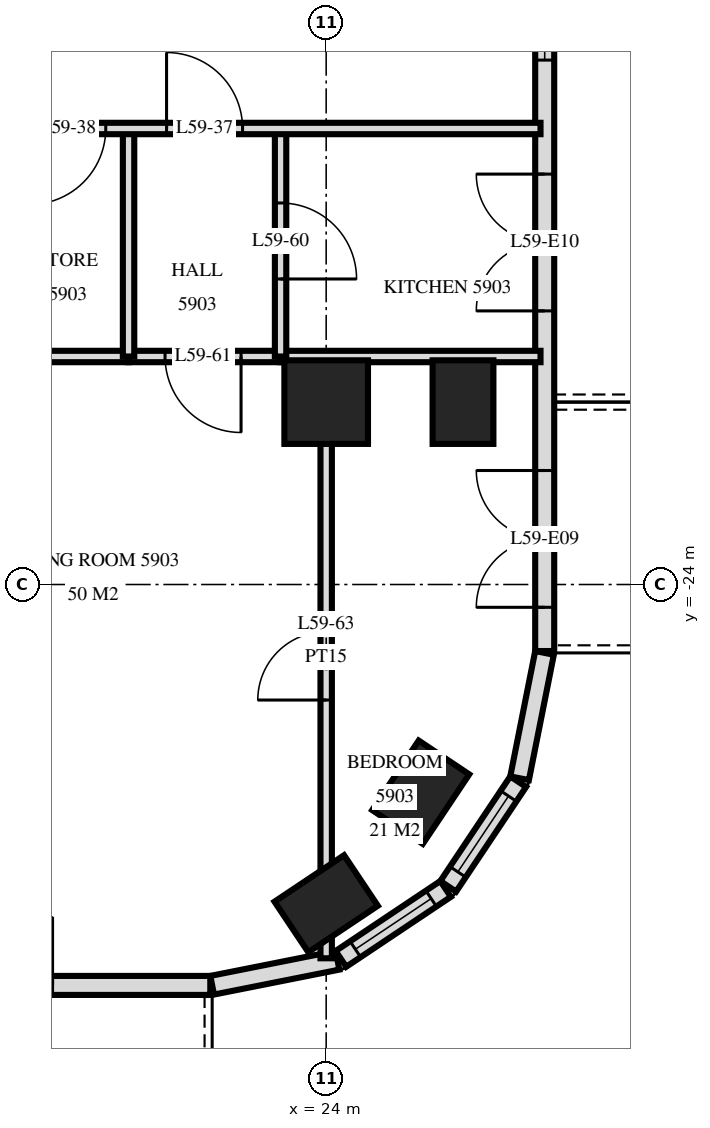
"""IFC4 building model, lengths in metres.
Left out: names, types, materials, properties, quantities, classifications, styles, units other than length and angle.
Written with IfcOpenShell. Run it as: python <this file> out.ifc"""

import sys

from ifc_helpers import new_model, si_unit, direction, frame, frame_2d, origin, origin_2d, place, context, subcontext, project, spatial, rectangle, extrude, element, fill, save


model = new_model("IFC4")
c1 = context("Model", 3, precision=1e-05, world=origin(), true_north=direction((0.0, 1.0)))
c2 = subcontext(c1, "Body", "Model", "MODEL_VIEW")
j1 = project(units=[si_unit("LENGTHUNIT", "METRE"), si_unit("PLANEANGLEUNIT", "RADIAN")], contexts=[c1])
p1 = place(None, origin())
s1 = spatial("IfcSite", under=j1, at=p1, CompositionType="ELEMENT")
p2 = place(p1, origin())
s2 = spatial("IfcBuilding", under=s1, at=p2, CompositionType="ELEMENT")
p3 = place(p2, frame((0.0, 0.0, 225.6)))
s3 = spatial("IfcBuildingStorey", under=s2, at=p3, CompositionType="ELEMENT", Elevation=225.6)
p4 = place(p3, frame((24.0, -28.2, 0.0), z_axis=(0.0, 0.0, 1.0), x_axis=(0.831459915646, 0.555584744817, 0.0)))
e1 = element("IfcColumn", 1, at=p4, inside=s3, PredefinedType="COLUMN", context=c2, shape_type="SweptSolid", body=[
    extrude(rectangle(XDim=1.1, YDim=0.8, at=origin_2d()), origin(), (0.0, 0.0, 1.0), 3.5),
])
p5 = place(p3, frame((24.0, -21.6, 0.0), z_axis=(0.0, 0.0, 1.0), x_axis=(1.0, 0.0, 0.0)))
e2 = element("IfcColumn", 2, at=p5, inside=s3, PredefinedType="COLUMN", context=c2, shape_type="SweptSolid", body=[
    extrude(rectangle(XDim=1.1, YDim=1.1, at=origin_2d()), origin(), (0.0, 0.0, 1.0), 3.5),
])
for number, where, z_axis, x_axis in (
    (3, (25.244, -26.733, 0.0), (0.0, 0.0, 1.0), (0.556, 0.831, 0.0)),
    (4, (25.8, -21.6, 0.0), (0.0, 0.0, 1.0), (0.0, 1.0, 0.0)),
):
    element("IfcColumn", number, at=place(p3, frame(where, z_axis=z_axis, x_axis=x_axis)), inside=s3, PredefinedType="COLUMN", context=c2, shape_type="SweptSolid", body=[
        extrude(rectangle(XDim=1.1, YDim=0.8, at=origin_2d()), origin(), (0.0, 0.0, 1.0), 3.5),
    ])
p6 = place(p3, frame((-22.475, -29.275, 0.0), z_axis=(0.0, 0.0, 1.0), x_axis=(1.0, 0.0, 0.0)))
e5 = element("IfcWall", 5, at=p6, inside=s3, PredefinedType="SOLIDWALL", context=c2, shape_type="SweptSolid", body=[
    extrude(rectangle(XDim=44.951, YDim=0.25, at=frame_2d((22.475, 0.0))), origin(), (0.0, 0.0, 1.0), 3.22),
])
p7 = place(p6, frame((0.575, 0.0, 0.0)))
e6 = element("IfcOpeningElement", 6, at=p7, cuts=e5, PredefinedType="OPENING", context=c2, shape_type="SweptSolid", body=[
    extrude(rectangle(XDim=1.8, YDim=2.4, at=frame_2d((0.9, 1.2))), frame((0.0, 0.135, 0.0), z_axis=(0.0, -1.0, 0.0), x_axis=(1.0, 0.0, 0.0)), (0.0, 0.0, 1.0), 0.27),
])
p8 = place(p6, frame((8.075, 0.0, 0.0)))
e7 = element("IfcOpeningElement", 7, at=p8, cuts=e5, PredefinedType="OPENING", context=c2, shape_type="SweptSolid", body=[
    extrude(rectangle(XDim=1.8, YDim=2.4, at=frame_2d((0.9, 1.2))), frame((0.0, 0.135, 0.0), z_axis=(0.0, -1.0, 0.0), x_axis=(1.0, 0.0, 0.0)), (0.0, 0.0, 1.0), 0.27),
])
p9 = place(p6, frame((11.075, 0.0, 0.0)))
e8 = element("IfcOpeningElement", 8, at=p9, cuts=e5, PredefinedType="OPENING", context=c2, shape_type="SweptSolid", body=[
    extrude(rectangle(XDim=1.8, YDim=2.4, at=frame_2d((0.9, 1.2))), frame((0.0, 0.135, 0.0), z_axis=(0.0, -1.0, 0.0), x_axis=(1.0, 0.0, 0.0)), (0.0, 0.0, 1.0), 0.27),
])
p10 = place(p6, frame((13.775, 0.0, 0.9)))
e9 = element("IfcOpeningElement", 9, at=p10, cuts=e5, PredefinedType="OPENING", context=c2, shape_type="SweptSolid", body=[
    extrude(rectangle(XDim=2.4, YDim=1.5, at=frame_2d((1.2, 0.75))), frame((0.0, 0.135, 0.0), z_axis=(0.0, -1.0, 0.0), x_axis=(1.0, 0.0, 0.0)), (0.0, 0.0, 1.0), 0.27),
])
p11 = place(p6, frame((16.775, 0.0, 0.9)))
e10 = element("IfcOpeningElement", 10, at=p11, cuts=e5, PredefinedType="OPENING", context=c2, shape_type="SweptSolid", body=[
    extrude(rectangle(XDim=2.4, YDim=1.5, at=frame_2d((1.2, 0.75))), frame((0.0, 0.135, 0.0), z_axis=(0.0, -1.0, 0.0), x_axis=(1.0, 0.0, 0.0)), (0.0, 0.0, 1.0), 0.27),
])
p12 = place(p6, frame((20.075, 0.0, 0.0)))
e11 = element("IfcOpeningElement", 11, at=p12, cuts=e5, PredefinedType="OPENING", context=c2, shape_type="SweptSolid", body=[
    extrude(rectangle(XDim=1.8, YDim=2.4, at=frame_2d((0.9, 1.2))), frame((0.0, 0.135, 0.0), z_axis=(0.0, -1.0, 0.0), x_axis=(1.0, 0.0, 0.0)), (0.0, 0.0, 1.0), 0.27),
])
p13 = place(p6, frame((23.075, 0.0, 0.0)))
e12 = element("IfcOpeningElement", 12, at=p13, cuts=e5, PredefinedType="OPENING", context=c2, shape_type="SweptSolid", body=[
    extrude(rectangle(XDim=1.8, YDim=2.4, at=frame_2d((0.9, 1.2))), frame((0.0, 0.135, 0.0), z_axis=(0.0, -1.0, 0.0), x_axis=(1.0, 0.0, 0.0)), (0.0, 0.0, 1.0), 0.27),
])
p14 = place(p6, frame((25.775, 0.0, 0.9)))
e13 = element("IfcOpeningElement", 13, at=p14, cuts=e5, PredefinedType="OPENING", context=c2, shape_type="SweptSolid", body=[
    extrude(rectangle(XDim=2.4, YDim=1.5, at=frame_2d((1.2, 0.75))), frame((0.0, 0.135, 0.0), z_axis=(0.0, -1.0, 0.0), x_axis=(1.0, 0.0, 0.0)), (0.0, 0.0, 1.0), 0.27),
])
p15 = place(p6, frame((29.075, 0.0, 0.0)))
e14 = element("IfcOpeningElement", 14, at=p15, cuts=e5, PredefinedType="OPENING", context=c2, shape_type="SweptSolid", body=[
    extrude(rectangle(XDim=1.8, YDim=2.4, at=frame_2d((0.9, 1.2))), frame((0.0, 0.135, 0.0), z_axis=(0.0, -1.0, 0.0), x_axis=(1.0, 0.0, 0.0)), (0.0, 0.0, 1.0), 0.27),
])
p16 = place(p6, frame((31.775, 0.0, 0.9)))
e15 = element("IfcOpeningElement", 15, at=p16, cuts=e5, PredefinedType="OPENING", context=c2, shape_type="SweptSolid", body=[
    extrude(rectangle(XDim=2.4, YDim=1.5, at=frame_2d((1.2, 0.75))), frame((0.0, 0.135, 0.0), z_axis=(0.0, -1.0, 0.0), x_axis=(1.0, 0.0, 0.0)), (0.0, 0.0, 1.0), 0.27),
])
p17 = place(p6, frame((35.075, 0.0, 0.0)))
e16 = element("IfcOpeningElement", 16, at=p17, cuts=e5, PredefinedType="OPENING", context=c2, shape_type="SweptSolid", body=[
    extrude(rectangle(XDim=1.8, YDim=2.4, at=frame_2d((0.9, 1.2))), frame((0.0, 0.135, 0.0), z_axis=(0.0, -1.0, 0.0), x_axis=(1.0, 0.0, 0.0)), (0.0, 0.0, 1.0), 0.27),
])
p18 = place(p6, frame((37.775, 0.0, 0.9)))
e17 = element("IfcOpeningElement", 17, at=p18, cuts=e5, PredefinedType="OPENING", context=c2, shape_type="SweptSolid", body=[
    extrude(rectangle(XDim=2.4, YDim=1.5, at=frame_2d((1.2, 0.75))), frame((0.0, 0.135, 0.0), z_axis=(0.0, -1.0, 0.0), x_axis=(1.0, 0.0, 0.0)), (0.0, 0.0, 1.0), 0.27),
])
p19 = place(p6, frame((41.075, 0.0, 0.0)))
e18 = element("IfcOpeningElement", 18, at=p19, cuts=e5, PredefinedType="OPENING", context=c2, shape_type="SweptSolid", body=[
    extrude(rectangle(XDim=1.8, YDim=2.4, at=frame_2d((0.9, 1.2))), frame((0.0, 0.135, 0.0), z_axis=(0.0, -1.0, 0.0), x_axis=(1.0, 0.0, 0.0)), (0.0, 0.0, 1.0), 0.27),
])
p20 = place(p3, frame((22.5, -29.273, 0.0), z_axis=(0.0, 0.0, 1.0), x_axis=(0.980775640221, 0.19513878023, 0.0)))
e19 = element("IfcWall", 19, at=p20, inside=s3, PredefinedType="SOLIDWALL", context=c2, shape_type="SweptSolid", body=[
    extrude(rectangle(XDim=1.681, YDim=0.25, at=frame_2d((0.841, 0.0))), origin(), (0.0, 0.0, 1.0), 3.22),
])
p21 = place(p3, frame((24.194, -28.926, 0.0), z_axis=(0.0, 0.0, 1.0), x_axis=(0.831482937015, 0.55555029066, 0.0)))
e20 = element("IfcWall", 20, at=p21, inside=s3, PredefinedType="SOLIDWALL", context=c2, shape_type="SweptSolid", body=[
    extrude(rectangle(XDim=1.656, YDim=0.25, at=frame_2d((0.828, 0.0))), origin(), (0.0, 0.0, 1.0), 3.22),
])
p22 = place(p21, frame((0.228, 0.0, 0.9)))
e21 = element("IfcOpeningElement", 21, at=p22, cuts=e20, PredefinedType="OPENING", context=c2, shape_type="SweptSolid", body=[
    extrude(rectangle(XDim=1.2, YDim=1.5, at=frame_2d((0.6, 0.75))), frame((0.0, 0.135, 0.0), z_axis=(0.0, -1.0, 0.0), x_axis=(1.0, 0.0, 0.0)), (0.0, 0.0, 1.0), 0.27),
])
p23 = place(p3, frame((25.606, -27.971, 0.0), z_axis=(0.0, 0.0, 1.0), x_axis=(0.55555029066, 0.831482937015, 0.0)))
e22 = element("IfcWall", 22, at=p23, inside=s3, PredefinedType="SOLIDWALL", context=c2, shape_type="SweptSolid", body=[
    extrude(rectangle(XDim=1.656, YDim=0.25, at=frame_2d((0.828, 0.0))), origin(), (0.0, 0.0, 1.0), 3.22),
])
p24 = place(p23, frame((0.228, 0.0, 0.9)))
e23 = element("IfcOpeningElement", 23, at=p24, cuts=e22, PredefinedType="OPENING", context=c2, shape_type="SweptSolid", body=[
    extrude(rectangle(XDim=1.2, YDim=1.5, at=frame_2d((0.6, 0.75))), frame((0.0, 0.135, 0.0), z_axis=(0.0, -1.0, 0.0), x_axis=(1.0, 0.0, 0.0)), (0.0, 0.0, 1.0), 0.27),
])
p25 = place(p3, frame((26.545, -26.549, 0.0), z_axis=(0.0, 0.0, 1.0), x_axis=(0.195026884138, 0.980797896849, 0.0)))
e24 = element("IfcWall", 24, at=p25, inside=s3, PredefinedType="SOLIDWALL", context=c2, shape_type="SweptSolid", body=[
    extrude(rectangle(XDim=1.681, YDim=0.25, at=frame_2d((0.841, 0.0))), origin(), (0.0, 0.0, 1.0), 3.22),
])
p26 = place(p3, frame((26.875, -24.875, 0.0), z_axis=(0.0, 0.0, 1.0), x_axis=(0.0, 1.0, 0.0)))
e25 = element("IfcWall", 25, at=p26, inside=s3, PredefinedType="SOLIDWALL", context=c2, shape_type="SweptSolid", body=[
    extrude(rectangle(XDim=21.551, YDim=0.25, at=frame_2d((10.775, 0.0))), origin(), (0.0, 0.0, 1.0), 3.22),
])
p27 = place(p26, frame((0.575, 0.0, 0.0)))
e26 = element("IfcOpeningElement", 26, at=p27, cuts=e25, PredefinedType="OPENING", context=c2, shape_type="SweptSolid", body=[
    extrude(rectangle(XDim=1.8, YDim=2.4, at=frame_2d((0.9, 1.2))), frame((0.0, 0.135, 0.0), z_axis=(0.0, -1.0, 0.0), x_axis=(1.0, 0.0, 0.0)), (0.0, 0.0, 1.0), 0.27),
])
p28 = place(p26, frame((4.475, 0.0, 0.0)))
e27 = element("IfcOpeningElement", 27, at=p28, cuts=e25, PredefinedType="OPENING", context=c2, shape_type="SweptSolid", body=[
    extrude(rectangle(XDim=1.8, YDim=2.4, at=frame_2d((0.9, 1.2))), frame((0.0, 0.135, 0.0), z_axis=(0.0, -1.0, 0.0), x_axis=(1.0, 0.0, 0.0)), (0.0, 0.0, 1.0), 0.27),
])
p29 = place(p26, frame((7.775, 0.0, 0.9)))
e28 = element("IfcOpeningElement", 28, at=p29, cuts=e25, PredefinedType="OPENING", context=c2, shape_type="SweptSolid", body=[
    extrude(rectangle(XDim=1.2, YDim=1.5, at=frame_2d((0.6, 0.75))), frame((0.0, 0.135, 0.0), z_axis=(0.0, -1.0, 0.0), x_axis=(1.0, 0.0, 0.0)), (0.0, 0.0, 1.0), 0.27),
])
p30 = place(p26, frame((13.1, 0.0, 0.0)))
e29 = element("IfcOpeningElement", 29, at=p30, cuts=e25, PredefinedType="OPENING", context=c2, shape_type="SweptSolid", body=[
    extrude(rectangle(XDim=1.8, YDim=2.4, at=frame_2d((0.9, 1.2))), frame((0.0, 0.135, 0.0), z_axis=(0.0, -1.0, 0.0), x_axis=(1.0, 0.0, 0.0)), (0.0, 0.0, 1.0), 0.27),
])
p31 = place(p3, frame((24.0, -28.918, 0.0), z_axis=(0.0, 0.0, 1.0), x_axis=(0.0, 1.0, 0.0)))
e30 = element("IfcWall", 30, at=p31, inside=s3, PredefinedType="PARTITIONING", context=c2, shape_type="SweptSolid", body=[
    extrude(rectangle(XDim=7.918, YDim=0.15, at=frame_2d((3.959, 0.0))), origin(), (0.0, 0.0, 1.0), 3.22),
])
p32 = place(p31, frame((3.398, 0.0, 0.0)))
e31 = element("IfcOpeningElement", 31, at=p32, cuts=e30, PredefinedType="OPENING", context=c2, shape_type="SweptSolid", body=[
    extrude(rectangle(XDim=0.9, YDim=2.1, at=frame_2d((0.45, 1.05))), frame((0.0, 0.085, 0.0), z_axis=(0.0, -1.0, 0.0), x_axis=(1.0, 0.0, 0.0)), (0.0, 0.0, 1.0), 0.17),
])
p33 = place(p3, frame((23.4, -21.0, 0.0), z_axis=(0.0, 0.0, 1.0), x_axis=(0.0, 1.0, 0.0)))
e32 = element("IfcWall", 32, at=p33, inside=s3, PredefinedType="PARTITIONING", context=c2, shape_type="SweptSolid", body=[
    extrude(rectangle(XDim=3.0, YDim=0.15, at=frame_2d((1.5, 0.0))), origin(), (0.0, 0.0, 1.0), 3.22),
])
p34 = place(p33, frame((1.02, 0.0, 0.0)))
e33 = element("IfcOpeningElement", 33, at=p34, cuts=e32, PredefinedType="OPENING", context=c2, shape_type="SweptSolid", body=[
    extrude(rectangle(XDim=1.0, YDim=2.1, at=frame_2d((0.5, 1.05))), frame((0.0, 0.085, 0.0), z_axis=(0.0, -1.0, 0.0), x_axis=(1.0, 0.0, 0.0)), (0.0, 0.0, 1.0), 0.17),
])
p35 = place(p3, frame((21.4, -21.0, 0.0), z_axis=(0.0, 0.0, 1.0), x_axis=(0.0, 1.0, 0.0)))
e34 = element("IfcWall", 34, at=p35, inside=s3, PredefinedType="PARTITIONING", context=c2, shape_type="SweptSolid", body=[
    extrude(rectangle(XDim=3.0, YDim=0.15, at=frame_2d((1.5, 0.0))), origin(), (0.0, 0.0, 1.0), 3.22),
])
p36 = place(p3, frame((21.4, -21.0, 0.0), z_axis=(0.0, 0.0, 1.0), x_axis=(1.0, 0.0, 0.0)))
e35 = element("IfcWall", 35, at=p36, inside=s3, PredefinedType="PARTITIONING", context=c2, shape_type="SweptSolid", body=[
    extrude(rectangle(XDim=2.0, YDim=0.15, at=frame_2d((1.0, 0.0))), origin(), (0.0, 0.0, 1.0), 3.22),
])
p37 = place(p36, frame((0.48, 0.0, 0.0)))
e36 = element("IfcOpeningElement", 36, at=p37, cuts=e35, PredefinedType="OPENING", context=c2, shape_type="SweptSolid", body=[
    extrude(rectangle(XDim=1.0, YDim=2.1, at=frame_2d((0.5, 1.05))), frame((0.0, 0.085, 0.0), z_axis=(0.0, -1.0, 0.0), x_axis=(1.0, 0.0, 0.0)), (0.0, 0.0, 1.0), 0.17),
])
p38 = place(p3, frame((13.3, -21.0, 0.0), z_axis=(0.0, 0.0, 1.0), x_axis=(1.0, 0.0, 0.0)))
e37 = element("IfcWall", 37, at=p38, inside=s3, PredefinedType="PARTITIONING", context=c2, shape_type="SweptSolid", body=[
    extrude(rectangle(XDim=8.1, YDim=0.15, at=frame_2d((4.05, 0.0))), origin(), (0.0, 0.0, 1.0), 3.22),
])
p39 = place(p38, frame((2.48, 0.0, 0.0)))
e38 = element("IfcOpeningElement", 38, at=p39, cuts=e37, PredefinedType="OPENING", context=c2, shape_type="SweptSolid", body=[
    extrude(rectangle(XDim=0.8, YDim=2.1, at=frame_2d((0.4, 1.05))), frame((0.0, 0.085, 0.0), z_axis=(0.0, -1.0, 0.0), x_axis=(1.0, 0.0, 0.0)), (0.0, 0.0, 1.0), 0.17),
])
p40 = place(p38, frame((5.35, 0.0, 0.0)))
e39 = element("IfcOpeningElement", 39, at=p40, cuts=e37, PredefinedType="OPENING", context=c2, shape_type="SweptSolid", body=[
    extrude(rectangle(XDim=0.8, YDim=2.1, at=frame_2d((0.4, 1.05))), frame((0.0, 0.085, 0.0), z_axis=(0.0, -1.0, 0.0), x_axis=(1.0, 0.0, 0.0)), (0.0, 0.0, 1.0), 0.17),
])
p41 = place(p3, frame((23.4, -21.0, 0.0), z_axis=(0.0, 0.0, 1.0), x_axis=(1.0, 0.0, 0.0)))
e40 = element("IfcWall", 40, at=p41, inside=s3, PredefinedType="PARTITIONING", context=c2, shape_type="SweptSolid", body=[
    extrude(rectangle(XDim=3.42, YDim=0.15, at=frame_2d((1.71, 0.0))), origin(), (0.0, 0.0, 1.0), 3.22),
])
p42 = place(p3, frame((-26.82, -18.0, 0.0), z_axis=(0.0, 0.0, 1.0), x_axis=(1.0, 0.0, 0.0)))
e41 = element("IfcWall", 41, at=p42, inside=s3, PredefinedType="PARTITIONING", context=c2, shape_type="SweptSolid", body=[
    extrude(rectangle(XDim=53.64, YDim=0.15, at=frame_2d((26.82, 0.0))), origin(), (0.0, 0.0, 1.0), 3.22),
])
p43 = place(p42, frame((4.92, 0.0, 0.0)))
e42 = element("IfcOpeningElement", 42, at=p43, cuts=e41, PredefinedType="OPENING", context=c2, shape_type="SweptSolid", body=[
    extrude(rectangle(XDim=1.0, YDim=2.1, at=frame_2d((0.5, 1.05))), frame((0.0, 0.085, 0.0), z_axis=(0.0, -1.0, 0.0), x_axis=(1.0, 0.0, 0.0)), (0.0, 0.0, 1.0), 0.17),
])
p44 = place(p42, frame((1.62, 0.0, 0.0)))
e43 = element("IfcOpeningElement", 43, at=p44, cuts=e41, PredefinedType="OPENING", context=c2, shape_type="SweptSolid", body=[
    extrude(rectangle(XDim=1.0, YDim=2.1, at=frame_2d((0.5, 1.05))), frame((0.0, 0.085, 0.0), z_axis=(0.0, -1.0, 0.0), x_axis=(1.0, 0.0, 0.0)), (0.0, 0.0, 1.0), 0.17),
])
p45 = place(p42, frame((38.97, 0.0, 0.0)))
e44 = element("IfcOpeningElement", 44, at=p45, cuts=e41, PredefinedType="OPENING", context=c2, shape_type="SweptSolid", body=[
    extrude(rectangle(XDim=1.0, YDim=2.1, at=frame_2d((0.5, 1.05))), frame((0.0, 0.085, 0.0), z_axis=(0.0, -1.0, 0.0), x_axis=(1.0, 0.0, 0.0)), (0.0, 0.0, 1.0), 0.17),
])
p46 = place(p42, frame((48.72, 0.0, 0.0)))
e45 = element("IfcOpeningElement", 45, at=p46, cuts=e41, PredefinedType="OPENING", context=c2, shape_type="SweptSolid", body=[
    extrude(rectangle(XDim=1.0, YDim=2.1, at=frame_2d((0.5, 1.05))), frame((0.0, 0.085, 0.0), z_axis=(0.0, -1.0, 0.0), x_axis=(1.0, 0.0, 0.0)), (0.0, 0.0, 1.0), 0.17),
])
p47 = place(p42, frame((46.92, 0.0, 0.0)))
e46 = element("IfcOpeningElement", 46, at=p47, cuts=e41, PredefinedType="OPENING", context=c2, shape_type="SweptSolid", body=[
    extrude(rectangle(XDim=1.0, YDim=2.1, at=frame_2d((0.5, 1.05))), frame((0.0, 0.085, 0.0), z_axis=(0.0, -1.0, 0.0), x_axis=(1.0, 0.0, 0.0)), (0.0, 0.0, 1.0), 0.17),
])
p48 = place(p42, frame((18.82, 0.0, 0.0)))
e47 = element("IfcOpeningElement", 47, at=p48, cuts=e41, PredefinedType="OPENING", context=c2, shape_type="SweptSolid", body=[
    extrude(rectangle(XDim=1.0, YDim=2.1, at=frame_2d((0.5, 1.05))), frame((0.0, 0.085, 0.0), z_axis=(0.0, -1.0, 0.0), x_axis=(1.0, 0.0, 0.0)), (0.0, 0.0, 1.0), 0.17),
])
p49 = place(p42, frame((27.82, 0.0, 0.0)))
e48 = element("IfcOpeningElement", 48, at=p49, cuts=e41, PredefinedType="OPENING", context=c2, shape_type="SweptSolid", body=[
    extrude(rectangle(XDim=1.0, YDim=2.1, at=frame_2d((0.5, 1.05))), frame((0.0, 0.085, 0.0), z_axis=(0.0, -1.0, 0.0), x_axis=(1.0, 0.0, 0.0)), (0.0, 0.0, 1.0), 0.17),
])
p50 = place(p42, frame((35.32, 0.0, 0.0)))
e49 = element("IfcOpeningElement", 49, at=p50, cuts=e41, PredefinedType="OPENING", context=c2, shape_type="SweptSolid", body=[
    extrude(rectangle(XDim=1.0, YDim=2.1, at=frame_2d((0.5, 1.05))), frame((0.0, 0.085, 0.0), z_axis=(0.0, -1.0, 0.0), x_axis=(1.0, 0.0, 0.0)), (0.0, 0.0, 1.0), 0.17),
])
p51 = place(p22, origin())
e50 = element("IfcWindow", 50, at=p51, inside=s3, PartitioningType="SINGLE_PANEL", PredefinedType="WINDOW", context=c2, shape_type="SweptSolid", body=[
    extrude(rectangle(XDim=1.2, YDim=1.5, at=frame_2d((0.6, 0.75))), frame((0.0, 0.03, 0.0), z_axis=(0.0, -1.0, 0.0), x_axis=(1.0, 0.0, 0.0)), (0.0, 0.0, 1.0), 0.06),
])
fill(e21, e50)
p52 = place(p24, origin())
e51 = element("IfcWindow", 51, at=p52, inside=s3, PartitioningType="SINGLE_PANEL", PredefinedType="WINDOW", context=c2, shape_type="SweptSolid", body=[
    extrude(rectangle(XDim=1.2, YDim=1.5, at=frame_2d((0.6, 0.75))), frame((0.0, 0.03, 0.0), z_axis=(0.0, -1.0, 0.0), x_axis=(1.0, 0.0, 0.0)), (0.0, 0.0, 1.0), 0.06),
])
fill(e23, e51)
p53 = place(p19, origin())
e52 = element("IfcDoor", 52, at=p53, inside=s3, OperationType="DOUBLE_DOOR_SINGLE_SWING", PredefinedType="DOOR", context=c2, shape_type="SweptSolid", body=[
    extrude(rectangle(XDim=1.8, YDim=2.4, at=frame_2d((0.9, 1.2))), frame((0.0, 0.025, 0.0), z_axis=(0.0, -1.0, 0.0), x_axis=(1.0, 0.0, 0.0)), (0.0, 0.0, 1.0), 0.05),
])
fill(e18, e52)
p54 = place(p27, origin())
e53 = element("IfcDoor", 53, at=p54, inside=s3, OperationType="DOUBLE_DOOR_SINGLE_SWING", PredefinedType="DOOR", context=c2, shape_type="SweptSolid", body=[
    extrude(rectangle(XDim=1.8, YDim=2.4, at=frame_2d((0.9, 1.2))), frame((0.0, 0.025, 0.0), z_axis=(0.0, -1.0, 0.0), x_axis=(1.0, 0.0, 0.0)), (0.0, 0.0, 1.0), 0.05),
])
fill(e26, e53)
p55 = place(p28, origin())
e54 = element("IfcDoor", 54, at=p55, inside=s3, OperationType="DOUBLE_DOOR_SINGLE_SWING", PredefinedType="DOOR", context=c2, shape_type="SweptSolid", body=[
    extrude(rectangle(XDim=1.8, YDim=2.4, at=frame_2d((0.9, 1.2))), frame((0.0, 0.025, 0.0), z_axis=(0.0, -1.0, 0.0), x_axis=(1.0, 0.0, 0.0)), (0.0, 0.0, 1.0), 0.05),
])
fill(e27, e54)
p56 = place(p29, origin())
e55 = element("IfcWindow", 55, at=p56, inside=s3, PartitioningType="SINGLE_PANEL", PredefinedType="WINDOW", context=c2, shape_type="SweptSolid", body=[
    extrude(rectangle(XDim=1.2, YDim=1.5, at=frame_2d((0.6, 0.75))), frame((0.0, 0.03, 0.0), z_axis=(0.0, -1.0, 0.0), x_axis=(1.0, 0.0, 0.0)), (0.0, 0.0, 1.0), 0.06),
])
fill(e28, e55)
p57 = place(p46, origin())
e56 = element("IfcDoor", 56, at=p57, inside=s3, OperationType="SINGLE_SWING_RIGHT", PredefinedType="DOOR", context=c2, shape_type="SweptSolid", body=[
    extrude(rectangle(XDim=1.0, YDim=2.1, at=frame_2d((0.5, 1.05))), frame((0.0, 0.025, 0.0), z_axis=(0.0, -1.0, 0.0), x_axis=(1.0, 0.0, 0.0)), (0.0, 0.0, 1.0), 0.05),
])
fill(e45, e56)
p58 = place(p47, frame((0.5, 0.0, 0.0), z_axis=(0.0, 0.0, 1.0), x_axis=(-1.0, 0.0, 0.0)))
e57 = element("IfcDoor", 57, at=p58, inside=s3, OperationType="SINGLE_SWING_LEFT", PredefinedType="DOOR", context=c2, shape_type="SweptSolid", body=[
    extrude(rectangle(XDim=1.0, YDim=2.1, at=frame_2d((0.0, 1.05))), frame((0.0, -0.025, 0.0), z_axis=(0.0, 1.0, 0.0), x_axis=(-1.0, 0.0, 0.0)), (0.0, 0.0, 1.0), 0.05),
])
fill(e46, e57)
p59 = place(p34, frame((0.5, 0.0, 0.0), z_axis=(0.0, 0.0, 1.0), x_axis=(-1.0, 0.0, 0.0)))
e58 = element("IfcDoor", 58, at=p59, inside=s3, OperationType="SINGLE_SWING_LEFT", PredefinedType="DOOR", context=c2, shape_type="SweptSolid", body=[
    extrude(rectangle(XDim=1.0, YDim=2.1, at=frame_2d((0.0, 1.05))), frame((0.0, -0.025, 0.0), z_axis=(0.0, 1.0, 0.0), x_axis=(-1.0, 0.0, 0.0)), (0.0, 0.0, 1.0), 0.05),
])
fill(e33, e58)
p60 = place(p37, frame((0.5, 0.0, 0.0), z_axis=(0.0, 0.0, 1.0), x_axis=(-1.0, 0.0, 0.0)))
e59 = element("IfcDoor", 59, at=p60, inside=s3, OperationType="SINGLE_SWING_RIGHT", PredefinedType="DOOR", context=c2, shape_type="SweptSolid", body=[
    extrude(rectangle(XDim=1.0, YDim=2.1, at=frame_2d((0.0, 1.05))), frame((0.0, -0.025, 0.0), z_axis=(0.0, 1.0, 0.0), x_axis=(-1.0, 0.0, 0.0)), (0.0, 0.0, 1.0), 0.05),
])
fill(e36, e59)
p61 = place(p32, origin())
e60 = element("IfcDoor", 60, at=p61, inside=s3, OperationType="SINGLE_SWING_RIGHT", PredefinedType="DOOR", context=c2, shape_type="SweptSolid", body=[
    extrude(rectangle(XDim=0.9, YDim=2.1, at=frame_2d((0.45, 1.05))), frame((0.0, 0.025, 0.0), z_axis=(0.0, -1.0, 0.0), x_axis=(1.0, 0.0, 0.0)), (0.0, 0.0, 1.0), 0.05),
])
fill(e31, e60)
save(model, sys.argv[1])
